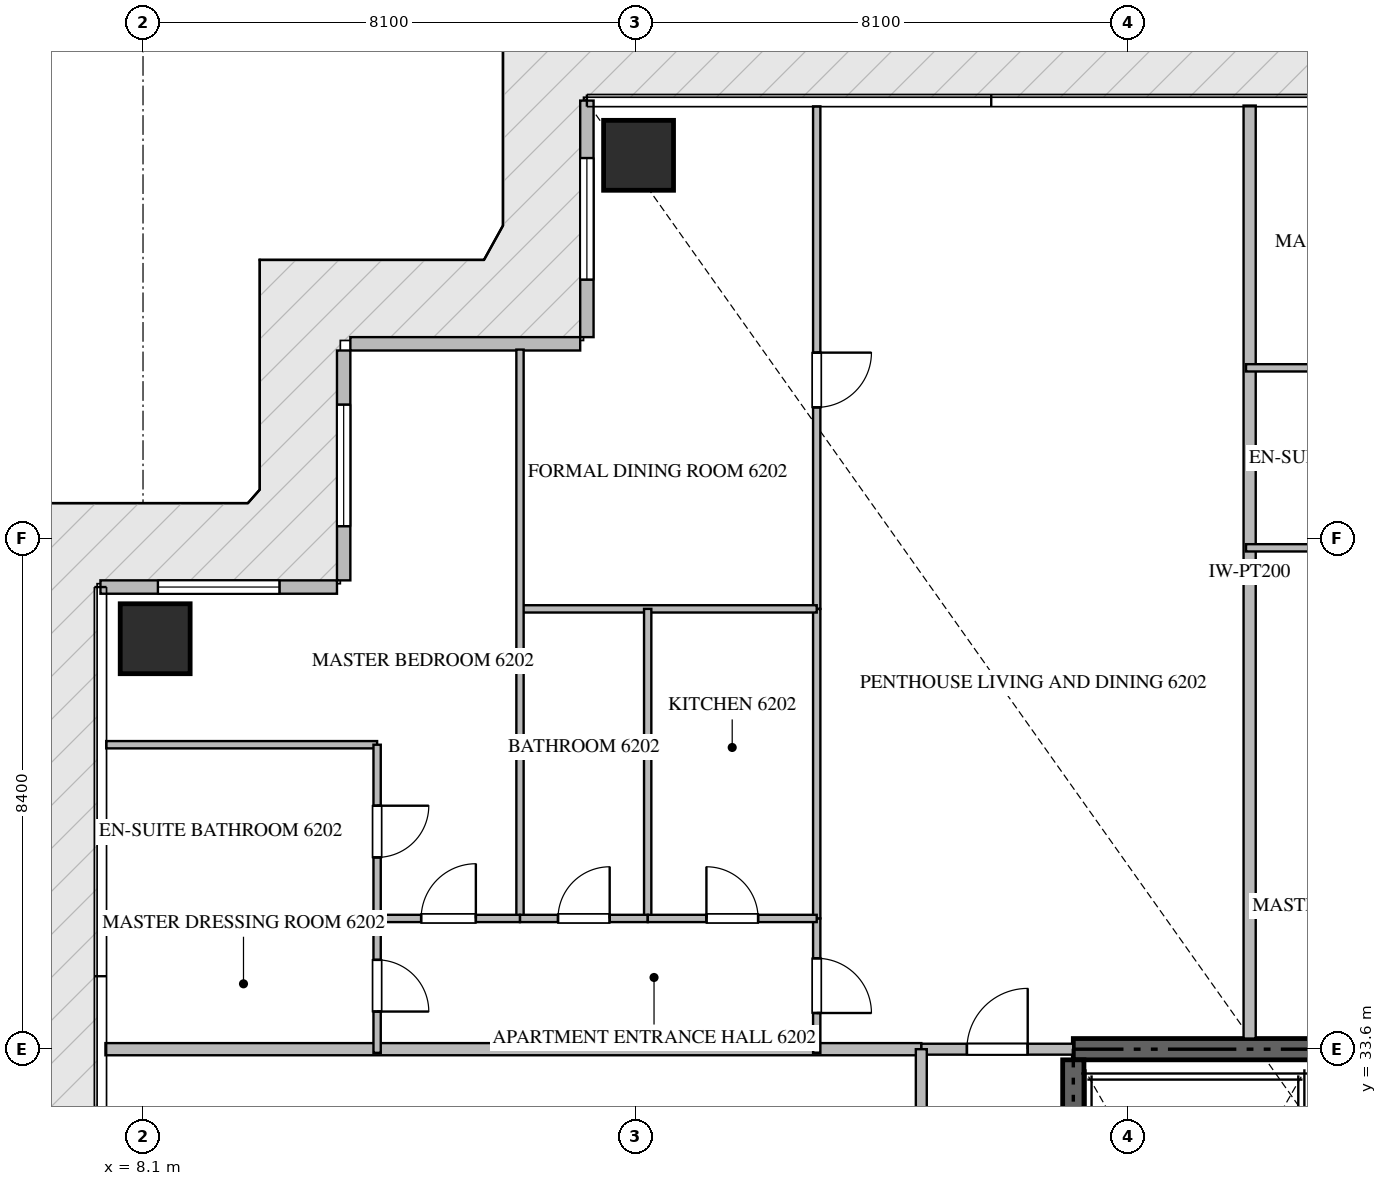
"""IFC4 building model, lengths in metres.
Left out: names, types, materials, properties, quantities, classifications, styles, units other than length and angle.
Written with IfcOpenShell. Run it as: python <this file> out.ifc"""

import sys

from ifc_helpers import new_model, si_unit, direction, frame, frame_2d, origin, origin_2d, place, context, subcontext, project, spatial, rectangle, extrude, source, transform, mapped, element, fill, save


model = new_model("IFC4")
c1 = context("Model", 3, precision=1e-05, world=origin(), true_north=direction((0.0, 1.0)))
c2 = subcontext(c1, "Body", "Model", "MODEL_VIEW")
j1 = project(units=[si_unit("LENGTHUNIT", "METRE"), si_unit("PLANEANGLEUNIT", "RADIAN")], contexts=[c1])
p1 = place(None, origin())
s1 = spatial("IfcSite", under=j1, at=p1, CompositionType="ELEMENT")
p2 = place(p1, origin())
s2 = spatial("IfcBuilding", under=s1, at=p2, CompositionType="ELEMENT")
p3 = place(p2, frame((0.0, 0.0, 248.95)))
s3 = spatial("IfcBuildingStorey", under=s2, at=p3, CompositionType="ELEMENT", Elevation=248.95)
p4 = place(p3, frame((41.4, 33.6, -0.26), z_axis=(0.0, 0.0, 1.0), x_axis=(-1.0, 0.0, 0.0)))
e1 = element("IfcWall", 1, at=p4, inside=s3, PredefinedType="SHEAR", context=c2, shape_type="SweptSolid", body=[
    extrude(rectangle(XDim=18.0, YDim=0.35, at=frame_2d((9.0, 0.0))), origin(), (0.0, 0.0, 1.0), 3.848),
])
p5 = place(p3, frame((23.4, 24.25, -0.26), z_axis=(0.0, 0.0, 1.0), x_axis=(0.0, 1.0, 0.0)))
e2 = element("IfcWall", 2, at=p5, inside=s3, PredefinedType="SHEAR", context=c2, shape_type="SweptSolid", body=[
    extrude(rectangle(XDim=9.175, YDim=0.35, at=frame_2d((4.587, 0.0))), origin(), (0.0, 0.0, 1.0), 3.848),
])
m1 = source(origin(), c2, "Body", "SweptSolid", [
    extrude(rectangle(XDim=1.15, YDim=1.15, at=origin_2d()), origin(), (0.0, 0.0, 1.0), 3.85),
])
for number, where, z_axis, x_axis in (
    (3, (16.25, 48.3, -0.26), (0.0, 0.0, 1.0), (1.0, 0.0, 0.0)),
    (4, (8.3, 40.35, -0.26), (0.0, 0.0, 1.0), (1.0, 0.0, 0.0)),
):
    element("IfcColumn", number, at=place(p3, frame(where, z_axis=z_axis, x_axis=x_axis)), inside=s3, PredefinedType="COLUMN", context=c2, shape_type="MappedRepresentation", body=[
        mapped(m1, transform((0.0, 0.0, 0.0), scale=1.0)),
    ])
p6 = place(p3, frame((15.4, 49.2, 0.0), z_axis=(0.0, 0.0, 1.0), x_axis=(0.0, -1.0, 0.0)))
e5 = element("IfcWall", 5, at=p6, inside=s3, PredefinedType="ELEMENTEDWALL", context=c2, shape_type="SweptSolid", body=[
    extrude(rectangle(XDim=3.89, YDim=0.22, at=frame_2d((1.945, 0.0))), origin(), (0.0, 0.0, 1.0), 3.575),
])
p7 = place(p6, frame((0.945, 0.0, 0.65)))
e6 = element("IfcOpeningElement", 6, at=p7, cuts=e5, PredefinedType="OPENING", context=c2, shape_type="SweptSolid", body=[
    extrude(rectangle(XDim=2.0, YDim=2.2, at=frame_2d((1.0, 1.1))), frame((0.0, 0.12, 0.0), z_axis=(0.0, -1.0, 0.0), x_axis=(1.0, 0.0, 0.0)), (0.0, 0.0, 1.0), 0.24),
])
p8 = place(p3, frame((15.29, 45.2, 0.0), z_axis=(0.0, 0.0, 1.0), x_axis=(-1.0, 0.0, 0.0)))
e7 = element("IfcWall", 7, at=p8, inside=s3, PredefinedType="ELEMENTEDWALL", context=c2, shape_type="SweptSolid", body=[
    extrude(rectangle(XDim=3.78, YDim=0.22, at=frame_2d((1.89, 0.0))), origin(), (0.0, 0.0, 1.0), 3.575),
])
p9 = place(p3, frame((11.4, 45.09, 0.0), z_axis=(0.0, 0.0, 1.0), x_axis=(0.0, -1.0, 0.0)))
e8 = element("IfcWall", 8, at=p9, inside=s3, PredefinedType="ELEMENTEDWALL", context=c2, shape_type="SweptSolid", body=[
    extrude(rectangle(XDim=3.78, YDim=0.22, at=frame_2d((1.89, 0.0))), origin(), (0.0, 0.0, 1.0), 3.575),
])
p10 = place(p9, frame((0.89, 0.0, 0.65)))
e9 = element("IfcOpeningElement", 9, at=p10, cuts=e8, PredefinedType="OPENING", context=c2, shape_type="SweptSolid", body=[
    extrude(rectangle(XDim=2.0, YDim=2.2, at=frame_2d((1.0, 1.1))), frame((0.0, 0.12, 0.0), z_axis=(0.0, -1.0, 0.0), x_axis=(1.0, 0.0, 0.0)), (0.0, 0.0, 1.0), 0.24),
])
p11 = place(p3, frame((11.29, 41.2, 0.0), z_axis=(0.0, 0.0, 1.0), x_axis=(-1.0, 0.0, 0.0)))
e10 = element("IfcWall", 10, at=p11, inside=s3, PredefinedType="ELEMENTEDWALL", context=c2, shape_type="SweptSolid", body=[
    extrude(rectangle(XDim=3.89, YDim=0.22, at=frame_2d((1.945, 0.0))), origin(), (0.0, 0.0, 1.0), 3.575),
])
p12 = place(p11, frame((0.945, 0.0, 0.65)))
e11 = element("IfcOpeningElement", 11, at=p12, cuts=e10, PredefinedType="OPENING", context=c2, shape_type="SweptSolid", body=[
    extrude(rectangle(XDim=2.0, YDim=2.2, at=frame_2d((1.0, 1.1))), frame((0.0, 0.12, 0.0), z_axis=(0.0, -1.0, 0.0), x_axis=(1.0, 0.0, 0.0)), (0.0, 0.0, 1.0), 0.24),
])
p13 = place(p3, frame((26.3, 33.775, 0.0), z_axis=(0.0, 0.0, 1.0), x_axis=(0.0, 1.0, 0.0)))
e12 = element("IfcWall", 12, at=p13, inside=s3, PredefinedType="PARTITIONING", context=c2, shape_type="SweptSolid", body=[
    extrude(rectangle(XDim=15.343, YDim=0.2, at=frame_2d((7.671, 0.0))), origin(), (0.0, 0.0, 1.0), 3.59),
])
p14 = place(p3, frame((7.482, 33.6, 0.0), z_axis=(0.0, 0.0, 1.0), x_axis=(1.0, 0.0, 0.0)))
e13 = element("IfcWall", 13, at=p14, inside=s3, PredefinedType="PARTITIONING", context=c2, shape_type="SweptSolid", body=[
    extrude(rectangle(XDim=13.418, YDim=0.2, at=frame_2d((6.709, 0.0))), origin(), (0.0, 0.0, 1.0), 3.59),
])
p15 = place(p3, frame((20.902, 33.6, 0.0), z_axis=(0.0, 0.0, 1.0), x_axis=(1.0, 0.0, 0.0)))
e14 = element("IfcWall", 14, at=p15, inside=s3, PredefinedType="PARTITIONING", context=c2, shape_type="SweptSolid", body=[
    extrude(rectangle(XDim=2.496, YDim=0.18, at=frame_2d((1.248, 0.0))), origin(), (0.0, 0.0, 1.0), 3.59),
])
p16 = place(p15, frame((0.748, 0.0, 0.0)))
e15 = element("IfcOpeningElement", 15, at=p16, cuts=e14, PredefinedType="OPENING", context=c2, shape_type="SweptSolid", body=[
    extrude(rectangle(XDim=1.0, YDim=2.15, at=frame_2d((0.5, 1.075))), frame((0.0, 0.1, 0.0), z_axis=(0.0, -1.0, 0.0), x_axis=(1.0, 0.0, 0.0)), (0.0, 0.0, 1.0), 0.2),
])
p17 = place(p3, frame((20.9, 16.8, 0.0), z_axis=(0.0, 0.0, 1.0), x_axis=(0.0, 1.0, 0.0)))
e16 = element("IfcWall", 16, at=p17, inside=s3, PredefinedType="PARTITIONING", context=c2, shape_type="SweptSolid", body=[
    extrude(rectangle(XDim=16.8, YDim=0.18, at=frame_2d((8.4, 0.0))), origin(), (0.0, 0.0, 1.0), 3.59),
])
p18 = place(p17, frame((4.803, 0.0, 0.0)))
e17 = element("IfcOpeningElement", 17, at=p18, cuts=e16, PredefinedType="OPENING", context=c2, shape_type="SweptSolid", body=[
    extrude(rectangle(XDim=1.0, YDim=2.15, at=frame_2d((0.5, 1.075))), frame((0.0, 0.1, 0.0), z_axis=(0.0, -1.0, 0.0), x_axis=(1.0, 0.0, 0.0)), (0.0, 0.0, 1.0), 0.2),
])
p19 = place(p17, frame((13.225, 0.0, 0.0)))
e18 = element("IfcOpeningElement", 18, at=p19, cuts=e16, PredefinedType="OPENING", context=c2, shape_type="SweptSolid", body=[
    extrude(rectangle(XDim=1.0, YDim=2.15, at=frame_2d((0.5, 1.075))), frame((0.0, 0.1, 0.0), z_axis=(0.0, -1.0, 0.0), x_axis=(1.0, 0.0, 0.0)), (0.0, 0.0, 1.0), 0.2),
])
p20 = place(p3, frame((19.18, 35.75, 0.0), z_axis=(0.0, 0.0, 1.0), x_axis=(0.0, -1.0, 0.0)))
e19 = element("IfcWall", 19, at=p20, inside=s3, PredefinedType="PARTITIONING", context=c2, shape_type="SweptSolid", body=[
    extrude(rectangle(XDim=2.21, YDim=0.12, at=frame_2d((1.105, 0.0))), origin(), (0.0, 0.0, 1.0), 3.59),
])
p21 = place(p20, frame((0.655, 0.0, 0.0)))
e20 = element("IfcOpeningElement", 20, at=p21, cuts=e19, PredefinedType="OPENING", context=c2, shape_type="SweptSolid", body=[
    extrude(rectangle(XDim=0.9, YDim=2.1, at=frame_2d((0.45, 1.05))), frame((0.0, 0.07, 0.0), z_axis=(0.0, -1.0, 0.0), x_axis=(1.0, 0.0, 0.0)), (0.0, 0.0, 1.0), 0.14),
])
p22 = place(p3, frame((19.18, 49.105, 0.0), z_axis=(0.0, 0.0, 1.0), x_axis=(0.0, -1.0, 0.0)))
e21 = element("IfcWall", 21, at=p22, inside=s3, PredefinedType="PARTITIONING", context=c2, shape_type="SweptSolid", body=[
    extrude(rectangle(XDim=8.264, YDim=0.12, at=frame_2d((4.132, 0.0))), origin(), (0.0, 0.0, 1.0), 3.59),
])
p23 = place(p22, frame((4.05, 0.0, 0.0)))
e22 = element("IfcOpeningElement", 22, at=p23, cuts=e21, PredefinedType="OPENING", context=c2, shape_type="SweptSolid", body=[
    extrude(rectangle(XDim=0.9, YDim=2.1, at=frame_2d((0.45, 1.05))), frame((0.0, 0.07, 0.0), z_axis=(0.0, -1.0, 0.0), x_axis=(1.0, 0.0, 0.0)), (0.0, 0.0, 1.0), 0.14),
])
p24 = place(p3, frame((19.18, 40.839, 0.0), z_axis=(0.0, 0.0, 1.0), x_axis=(0.0, -1.0, 0.0)))
e23 = element("IfcWall", 23, at=p24, inside=s3, PredefinedType="PARTITIONING", context=c2, shape_type="SweptSolid", body=[
    extrude(rectangle(XDim=5.087, YDim=0.12, at=frame_2d((2.543, 0.0))), origin(), (0.0, 0.0, 1.0), 3.59),
])
p25 = place(p3, frame((14.3, 40.841, 0.0), z_axis=(0.0, 0.0, 1.0), x_axis=(1.0, 0.0, 0.0)))
e24 = element("IfcWall", 24, at=p25, inside=s3, PredefinedType="PARTITIONING", context=c2, shape_type="SweptSolid", body=[
    extrude(rectangle(XDim=4.88, YDim=0.12, at=frame_2d((2.44, 0.0))), origin(), (0.0, 0.0, 1.0), 3.59),
])
p26 = place(p3, frame((14.3, 45.105, 0.0), z_axis=(0.0, 0.0, 1.0), x_axis=(0.0, -1.0, 0.0)))
e25 = element("IfcWall", 25, at=p26, inside=s3, PredefinedType="PARTITIONING", context=c2, shape_type="SweptSolid", body=[
    extrude(rectangle(XDim=9.355, YDim=0.12, at=frame_2d((4.677, 0.0))), origin(), (0.0, 0.0, 1.0), 3.59),
])
p27 = place(p3, frame((16.4, 40.841, 0.0), z_axis=(0.0, 0.0, 1.0), x_axis=(0.0, -1.0, 0.0)))
e26 = element("IfcWall", 26, at=p27, inside=s3, PredefinedType="PARTITIONING", context=c2, shape_type="SweptSolid", body=[
    extrude(rectangle(XDim=5.091, YDim=0.12, at=frame_2d((2.545, 0.0))), origin(), (0.0, 0.0, 1.0), 3.122),
])
p28 = place(p3, frame((14.3, 35.75, 0.0), z_axis=(0.0, 0.0, 1.0), x_axis=(1.0, 0.0, 0.0)))
e27 = element("IfcWall", 27, at=p28, inside=s3, PredefinedType="PARTITIONING", context=c2, shape_type="SweptSolid", body=[
    extrude(rectangle(XDim=2.1, YDim=0.12, at=frame_2d((1.05, 0.0))), origin(), (0.0, 0.0, 1.0), 3.59),
])
p29 = place(p28, frame((0.625, 0.0, 0.0)))
e28 = element("IfcOpeningElement", 28, at=p29, cuts=e27, PredefinedType="OPENING", context=c2, shape_type="SweptSolid", body=[
    extrude(rectangle(XDim=0.85, YDim=2.1, at=frame_2d((0.425, 1.05))), frame((0.0, 0.07, 0.0), z_axis=(0.0, -1.0, 0.0), x_axis=(1.0, 0.0, 0.0)), (0.0, 0.0, 1.0), 0.14),
])
p30 = place(p3, frame((16.402, 35.75, 0.0), z_axis=(0.0, 0.0, 1.0), x_axis=(1.0, 0.0, 0.0)))
e29 = element("IfcWall", 29, at=p30, inside=s3, PredefinedType="PARTITIONING", context=c2, shape_type="SweptSolid", body=[
    extrude(rectangle(XDim=2.778, YDim=0.12, at=frame_2d((1.389, 0.0))), origin(), (0.0, 0.0, 1.0), 3.59),
])
p31 = place(p30, frame((0.964, 0.0, 0.0)))
e30 = element("IfcOpeningElement", 30, at=p31, cuts=e29, PredefinedType="OPENING", context=c2, shape_type="SweptSolid", body=[
    extrude(rectangle(XDim=0.85, YDim=2.1, at=frame_2d((0.425, 1.05))), frame((0.0, 0.07, 0.0), z_axis=(0.0, -1.0, 0.0), x_axis=(1.0, 0.0, 0.0)), (0.0, 0.0, 1.0), 0.14),
])
p32 = place(p3, frame((11.95, 35.75, 0.0), z_axis=(0.0, 0.0, 1.0), x_axis=(1.0, 0.0, 0.0)))
e31 = element("IfcWall", 31, at=p32, inside=s3, PredefinedType="PARTITIONING", context=c2, shape_type="SweptSolid", body=[
    extrude(rectangle(XDim=2.348, YDim=0.12, at=frame_2d((1.174, 0.0))), origin(), (0.0, 0.0, 1.0), 3.59),
])
p33 = place(p32, frame((0.724, 0.0, 0.0)))
e32 = element("IfcOpeningElement", 32, at=p33, cuts=e31, PredefinedType="OPENING", context=c2, shape_type="SweptSolid", body=[
    extrude(rectangle(XDim=0.9, YDim=2.1, at=frame_2d((0.45, 1.05))), frame((0.0, 0.07, 0.0), z_axis=(0.0, -1.0, 0.0), x_axis=(1.0, 0.0, 0.0)), (0.0, 0.0, 1.0), 0.14),
])
p34 = place(p3, frame((7.495, 38.607, 0.0), z_axis=(0.0, 0.0, 1.0), x_axis=(1.0, 0.0, 0.0)))
e33 = element("IfcWall", 33, at=p34, inside=s3, PredefinedType="PARTITIONING", context=c2, shape_type="SweptSolid", body=[
    extrude(rectangle(XDim=4.455, YDim=0.12, at=frame_2d((2.228, 0.0))), origin(), (0.0, 0.0, 1.0), 3.59),
])
p35 = place(p3, frame((7.495, 35.75, 0.0), z_axis=(0.0, 0.0, 1.0), x_axis=(1.0, 0.0, 0.0)))
e34 = element("IfcWall", 34, at=p35, inside=s3, PredefinedType="PARTITIONING", context=c2, shape_type="SweptSolid", body=[
    extrude(rectangle(XDim=4.453, YDim=0.12, at=frame_2d((2.227, 0.0))), origin(), (0.0, 0.0, 1.0), 3.59),
])
p36 = place(p3, frame((11.95, 38.607, 0.0), z_axis=(0.0, 0.0, 1.0), x_axis=(0.0, -1.0, 0.0)))
e35 = element("IfcWall", 35, at=p36, inside=s3, PredefinedType="PARTITIONING", context=c2, shape_type="SweptSolid", body=[
    extrude(rectangle(XDim=2.857, YDim=0.12, at=frame_2d((1.428, 0.0))), origin(), (0.0, 0.0, 1.0), 3.59),
])
p37 = place(p36, frame((1.003, 0.0, 0.0)))
e36 = element("IfcOpeningElement", 36, at=p37, cuts=e35, PredefinedType="OPENING", context=c2, shape_type="SweptSolid", body=[
    extrude(rectangle(XDim=0.85, YDim=2.1, at=frame_2d((0.425, 1.05))), frame((0.0, 0.07, 0.0), z_axis=(0.0, -1.0, 0.0), x_axis=(1.0, 0.0, 0.0)), (0.0, 0.0, 1.0), 0.14),
])
p38 = place(p3, frame((11.95, 35.748, 0.0), z_axis=(0.0, 0.0, 1.0), x_axis=(0.0, -1.0, 0.0)))
e37 = element("IfcWall", 37, at=p38, inside=s3, PredefinedType="PARTITIONING", context=c2, shape_type="SweptSolid", body=[
    extrude(rectangle(XDim=2.208, YDim=0.12, at=frame_2d((1.104, 0.0))), origin(), (0.0, 0.0, 1.0), 3.59),
])
p39 = place(p38, frame((0.679, 0.0, 0.0)))
e38 = element("IfcOpeningElement", 38, at=p39, cuts=e37, PredefinedType="OPENING", context=c2, shape_type="SweptSolid", body=[
    extrude(rectangle(XDim=0.85, YDim=2.1, at=frame_2d((0.425, 1.05))), frame((0.0, 0.07, 0.0), z_axis=(0.0, -1.0, 0.0), x_axis=(1.0, 0.0, 0.0)), (0.0, 0.0, 1.0), 0.14),
])
for number, where, z_axis, x_axis in (
    (39, (26.24, 44.805, 0.0), (0.0, 0.0, 1.0), (1.0, 0.0, 0.0)),
    (40, (26.24, 41.845, 0.0), (0.0, 0.0, 1.0), (1.0, 0.0, 0.0)),
):
    element("IfcWall", number, at=place(p3, frame(where, z_axis=z_axis, x_axis=x_axis)), inside=s3, PredefinedType="PARTITIONING", context=c2, shape_type="SweptSolid", body=[
        extrude(rectangle(XDim=4.79, YDim=0.12, at=frame_2d((2.395, 0.0))), origin(), (0.0, 0.0, 1.0), 3.59),
    ])
m2 = source(origin(), c2, "Body", "SweptSolid", [
    extrude(rectangle(XDim=2.0, YDim=2.2, at=frame_2d((1.0, 1.1))), frame((0.0, 0.03, 0.0), z_axis=(0.0, -1.0, 0.0), x_axis=(1.0, 0.0, 0.0)), (0.0, 0.0, 1.0), 0.06),
])
p40 = place(p7, origin())
e41 = element("IfcWindow", 41, at=p40, inside=s3, PartitioningType="SINGLE_PANEL", PredefinedType="WINDOW", context=c2, shape_type="MappedRepresentation", body=[
    mapped(m2, transform((0.0, 0.0, 0.0), scale=1.0)),
])
fill(e6, e41)
p41 = place(p10, origin())
e42 = element("IfcWindow", 42, at=p41, inside=s3, PartitioningType="SINGLE_PANEL", PredefinedType="WINDOW", context=c2, shape_type="MappedRepresentation", body=[
    mapped(m2, transform((0.0, 0.0, 0.0), scale=1.0)),
])
fill(e9, e42)
p42 = place(p12, origin())
e43 = element("IfcWindow", 43, at=p42, inside=s3, PartitioningType="SINGLE_PANEL", PredefinedType="WINDOW", context=c2, shape_type="MappedRepresentation", body=[
    mapped(m2, transform((0.0, 0.0, 0.0), scale=1.0)),
])
fill(e11, e43)
m3 = source(origin(), c2, "Body", "SweptSolid", [
    extrude(rectangle(XDim=1.0, YDim=2.15, at=frame_2d((0.5, 1.075))), frame((0.0, 0.025, 0.0), z_axis=(0.0, -1.0, 0.0), x_axis=(1.0, 0.0, 0.0)), (0.0, 0.0, 1.0), 0.05),
])
p43 = place(p16, origin())
e44 = element("IfcDoor", 44, at=p43, inside=s3, OperationType="SINGLE_SWING_RIGHT", PredefinedType="DOOR", context=c2, shape_type="MappedRepresentation", body=[
    mapped(m3, transform((0.0, 0.0, 0.0), scale=1.0)),
])
fill(e15, e44)
m4 = source(origin(), c2, "Body", "SweptSolid", [
    extrude(rectangle(XDim=0.9, YDim=2.1, at=frame_2d((0.45, 1.05))), frame((0.0, 0.025, 0.0), z_axis=(0.0, -1.0, 0.0), x_axis=(1.0, 0.0, 0.0)), (0.0, 0.0, 1.0), 0.05),
])
p44 = place(p21, origin())
e45 = element("IfcDoor", 45, at=p44, inside=s3, OperationType="SINGLE_SWING_RIGHT", PredefinedType="DOOR", context=c2, shape_type="MappedRepresentation", body=[
    mapped(m4, transform((0.0, 0.0, 0.0), scale=1.0)),
])
fill(e20, e45)
p45 = place(p23, origin())
e46 = element("IfcDoor", 46, at=p45, inside=s3, OperationType="SINGLE_SWING_LEFT", PredefinedType="DOOR", context=c2, shape_type="MappedRepresentation", body=[
    mapped(m4, transform((0.0, 0.0, 0.0), scale=1.0)),
])
fill(e22, e46)
m5 = source(origin(), c2, "Body", "SweptSolid", [
    extrude(rectangle(XDim=0.85, YDim=2.1, at=frame_2d((0.425, 1.05))), frame((0.0, 0.025, 0.0), z_axis=(0.0, -1.0, 0.0), x_axis=(1.0, 0.0, 0.0)), (0.0, 0.0, 1.0), 0.05),
])
p46 = place(p29, origin())
e47 = element("IfcDoor", 47, at=p46, inside=s3, OperationType="SINGLE_SWING_RIGHT", PredefinedType="DOOR", context=c2, shape_type="MappedRepresentation", body=[
    mapped(m5, transform((0.0, 0.0, 0.0), scale=1.0)),
])
fill(e28, e47)
p47 = place(p31, origin())
e48 = element("IfcDoor", 48, at=p47, inside=s3, OperationType="SINGLE_SWING_LEFT", PredefinedType="DOOR", context=c2, shape_type="MappedRepresentation", body=[
    mapped(m5, transform((0.0, 0.0, 0.0), scale=1.0)),
])
fill(e30, e48)
p48 = place(p33, origin())
e49 = element("IfcDoor", 49, at=p48, inside=s3, OperationType="SINGLE_SWING_RIGHT", PredefinedType="DOOR", context=c2, shape_type="MappedRepresentation", body=[
    mapped(m4, transform((0.0, 0.0, 0.0), scale=1.0)),
])
fill(e32, e49)
p49 = place(p37, origin())
e50 = element("IfcDoor", 50, at=p49, inside=s3, OperationType="SINGLE_SWING_LEFT", PredefinedType="DOOR", context=c2, shape_type="MappedRepresentation", body=[
    mapped(m5, transform((0.0, 0.0, 0.0), scale=1.0)),
])
fill(e36, e50)
p50 = place(p39, origin())
e51 = element("IfcDoor", 51, at=p50, inside=s3, OperationType="SINGLE_SWING_RIGHT", PredefinedType="DOOR", context=c2, shape_type="MappedRepresentation", body=[
    mapped(m5, transform((0.0, 0.0, 0.0), scale=1.0)),
])
fill(e38, e51)
save(model, sys.argv[1])
